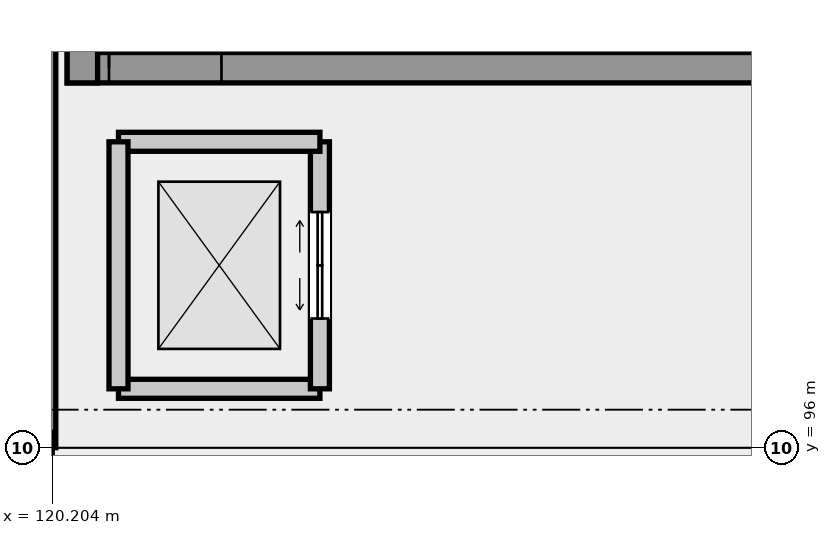
"""IFC4 building model, lengths in metres.
Left out: names, types, materials, properties, quantities, classifications, styles, units other than length and angle.
Written with IfcOpenShell. Run it as: python <this file> out.ifc"""

import sys

from ifc_helpers import new_model, si_unit, direction, frame, frame_2d, origin, origin_2d, place, context, subcontext, project, spatial, rectangle, hollow_circle, extrude, element, fill, save


model = new_model("IFC4")
c1 = context("Model", 3, precision=1e-05, world=origin(), true_north=direction((0.0, 1.0)))
c2 = subcontext(c1, "Body", "Model", "MODEL_VIEW")
j1 = project(units=[si_unit("LENGTHUNIT", "METRE"), si_unit("PLANEANGLEUNIT", "RADIAN")], contexts=[c1])
p1 = place(None, origin())
s1 = spatial("IfcSite", under=j1, at=p1, CompositionType="ELEMENT")
p2 = place(p1, origin())
s2 = spatial("IfcBuilding", under=s1, at=p2, CompositionType="ELEMENT")
p3 = place(p2, frame((0.0, 0.0, -5.4)))
s3 = spatial("IfcBuildingStorey", under=s2, at=p3, CompositionType="ELEMENT", Elevation=-5.4)
p4 = place(p3, frame((120.0, 96.0, 0.0), z_axis=(0.0, 0.0, 1.0), x_axis=(1.0, 0.0, 0.0)))
e1 = element("IfcColumn", 1, at=p4, inside=s3, PredefinedType="COLUMN", context=c2, shape_type="SweptSolid", body=[
    extrude(hollow_circle(Radius=0.203, WallThickness=0.016, at=origin_2d()), origin(), (0.0, 0.0, 1.0), 5.4),
])
p5 = place(p3, frame((120.0, 108.0, 0.0), z_axis=(0.0, 0.0, 1.0), x_axis=(0.0, -1.0, 0.0)))
e2 = element("IfcWall", 2, at=p5, inside=s3, PredefinedType="USERDEFINED", context=c2, shape_type="SweptSolid", body=[
    extrude(rectangle(XDim=12.0, YDim=0.5, at=frame_2d((6.0, 0.0))), origin(), (0.0, 0.0, 1.0), 4.54),
])
p6 = place(p3, frame((120.4, 101.0, 0.0), z_axis=(0.0, 0.0, 1.0), x_axis=(1.0, 0.0, 0.0)))
e3 = element("IfcWall", 3, at=p6, inside=s3, PredefinedType="SHEAR", context=c2, shape_type="SweptSolid", body=[
    extrude(rectangle(XDim=11.2, YDim=0.4, at=frame_2d((5.6, 0.0))), origin(), (0.0, 0.0, 1.0), 5.12),
])
p7 = place(p6, frame((0.55, 0.0, 0.0)))
e4 = element("IfcOpeningElement", 4, at=p7, cuts=e3, PredefinedType="OPENING", context=c2, shape_type="SweptSolid", body=[
    extrude(rectangle(XDim=1.48, YDim=2.3, at=frame_2d((0.74, 1.15))), frame((0.0, 0.21, 0.0), z_axis=(0.0, -1.0, 0.0), x_axis=(1.0, 0.0, 0.0)), (0.0, 0.0, 1.0), 0.42),
])
p8 = place(p3, frame((120.6, 105.65, 0.0), z_axis=(0.0, 0.0, 1.0), x_axis=(0.0, -1.0, 0.0)))
e5 = element("IfcWall", 5, at=p8, inside=s3, PredefinedType="SHEAR", context=c2, shape_type="SweptSolid", body=[
    extrude(rectangle(XDim=4.85, YDim=0.4, at=frame_2d((2.425, 0.0))), origin(), (0.0, 0.0, 1.0), 5.12),
])
p9 = place(p3, frame((121.075, 96.775, 0.0), z_axis=(0.0, 0.0, 1.0), x_axis=(1.0, 0.0, 0.0)))
e6 = element("IfcWall", 6, at=p9, inside=s3, PredefinedType="SOLIDWALL", context=c2, shape_type="SweptSolid", body=[
    extrude(rectangle(XDim=2.65, YDim=0.25, at=frame_2d((1.325, 0.0))), origin(), (0.0, 0.0, 1.0), 5.12),
])
p10 = place(p3, frame((123.725, 96.775, 0.0), z_axis=(0.0, 0.0, 1.0), x_axis=(0.0, 1.0, 0.0)))
e7 = element("IfcWall", 7, at=p10, inside=s3, PredefinedType="SOLIDWALL", context=c2, shape_type="SweptSolid", body=[
    extrude(rectangle(XDim=3.25, YDim=0.25, at=frame_2d((1.625, 0.0))), origin(), (0.0, 0.0, 1.0), 5.12),
])
p11 = place(p10, frame((0.925, 0.0, 0.0)))
e8 = element("IfcOpeningElement", 8, at=p11, cuts=e7, PredefinedType="OPENING", context=c2, shape_type="SweptSolid", body=[
    extrude(rectangle(XDim=1.4, YDim=2.3, at=frame_2d((0.7, 1.15))), frame((0.0, 0.135, 0.0), z_axis=(0.0, -1.0, 0.0), x_axis=(1.0, 0.0, 0.0)), (0.0, 0.0, 1.0), 0.27),
])
p12 = place(p3, frame((123.725, 100.025, 0.0), z_axis=(0.0, 0.0, 1.0), x_axis=(-1.0, 0.0, 0.0)))
e9 = element("IfcWall", 9, at=p12, inside=s3, PredefinedType="SOLIDWALL", context=c2, shape_type="SweptSolid", body=[
    extrude(rectangle(XDim=2.65, YDim=0.25, at=frame_2d((1.325, 0.0))), origin(), (0.0, 0.0, 1.0), 5.12),
])
p13 = place(p3, frame((121.075, 100.025, 0.0), z_axis=(0.0, 0.0, 1.0), x_axis=(0.0, -1.0, 0.0)))
e10 = element("IfcWall", 10, at=p13, inside=s3, PredefinedType="SOLIDWALL", context=c2, shape_type="SweptSolid", body=[
    extrude(rectangle(XDim=3.25, YDim=0.25, at=frame_2d((1.625, 0.0))), origin(), (0.0, 0.0, 1.0), 5.12),
])
p14 = place(p7, origin())
e11 = element("IfcDoor", 11, at=p14, inside=s3, OperationType="DOUBLE_DOOR_SINGLE_SWING", PredefinedType="DOOR", context=c2, shape_type="SweptSolid", body=[
    extrude(rectangle(XDim=1.48, YDim=2.3, at=frame_2d((0.74, 1.15))), frame((0.0, 0.025, 0.0), z_axis=(0.0, -1.0, 0.0), x_axis=(1.0, 0.0, 0.0)), (0.0, 0.0, 1.0), 0.05),
])
fill(e4, e11)
p15 = place(p11, origin())
e12 = element("IfcDoor", 12, at=p15, inside=s3, OperationType="SLIDING_TO_LEFT", PredefinedType="DOOR", context=c2, shape_type="SweptSolid", body=[
    extrude(rectangle(XDim=1.4, YDim=2.3, at=frame_2d((0.7, 1.15))), frame((0.0, 0.025, 0.0), z_axis=(0.0, -1.0, 0.0), x_axis=(1.0, 0.0, 0.0)), (0.0, 0.0, 1.0), 0.05),
])
fill(e8, e12)
save(model, sys.argv[1])
